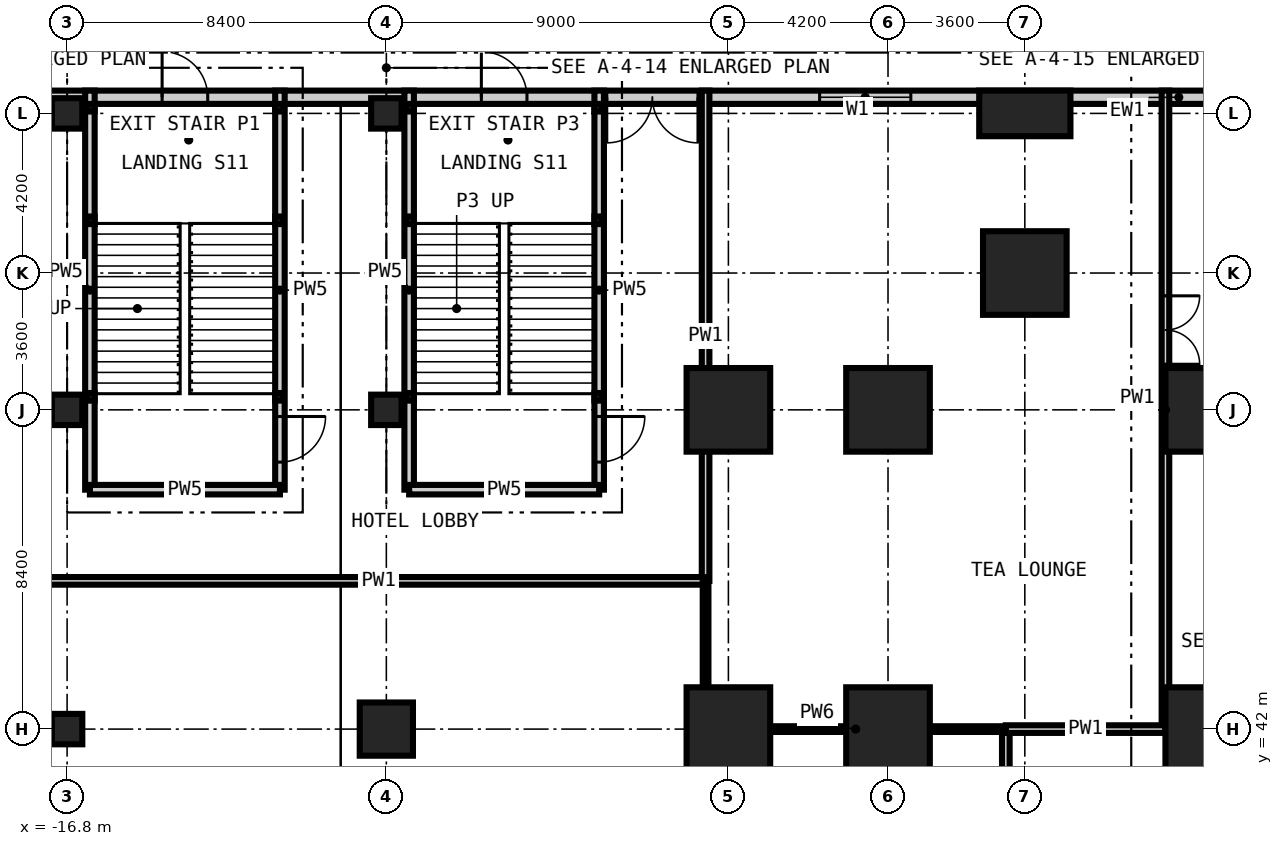
"""IFC4 building model, lengths in metres.
Left out: names, types, materials, properties, quantities, classifications, styles, units other than length and angle.
Written with IfcOpenShell. Run it as: python <this file> out.ifc"""

import sys

from ifc_helpers import new_model, si_unit, direction, frame, frame_2d, origin, origin_2d, place, context, subcontext, project, spatial, rectangle, hollow_rectangle, extrude, element, fill, save


model = new_model("IFC4")
c1 = context("Model", 3, precision=1e-05, world=origin(), true_north=direction((0.0, 1.0)))
c2 = subcontext(c1, "Body", "Model", "MODEL_VIEW")
j1 = project(units=[si_unit("LENGTHUNIT", "METRE"), si_unit("PLANEANGLEUNIT", "RADIAN")], contexts=[c1])
p1 = place(None, origin())
s1 = spatial("IfcSite", under=j1, at=p1, CompositionType="ELEMENT")
p2 = place(p1, origin())
s2 = spatial("IfcBuilding", under=s1, at=p2, CompositionType="ELEMENT")
p3 = place(p2, origin())
s3 = spatial("IfcBuildingStorey", under=s2, at=p3, CompositionType="ELEMENT", Elevation=0.0)
for number, where, z_axis, x_axis in (
    (1, (0.6, 42.0, -0.3), (0.0, 0.0, 1.0), (1.0, 0.0, 0.0)),
    (2, (0.6, 50.4, -0.3), (0.0, 0.0, 1.0), (1.0, 0.0, 0.0)),
    (3, (4.8, 42.0, -0.3), (0.0, 0.0, 1.0), (1.0, 0.0, 0.0)),
    (4, (4.8, 50.4, -0.3), (0.0, 0.0, 1.0), (1.0, 0.0, 0.0)),
    (5, (8.4, 54.0, -0.3), (0.0, 0.0, 1.0), (1.0, 0.0, 0.0)),
):
    element("IfcColumn", number, at=place(p3, frame(where, z_axis=z_axis, x_axis=x_axis)), inside=s3, PredefinedType="COLUMN", context=c2, shape_type="SweptSolid", body=[
        extrude(rectangle(XDim=2.2, YDim=2.2, at=origin_2d()), origin(), (0.0, 0.0, 1.0), 6.0),
    ])
p4 = place(p3, frame((8.4, 58.2, -0.3), z_axis=(0.0, 0.0, 1.0), x_axis=(1.0, 0.0, 0.0)))
e6 = element("IfcColumn", 6, at=p4, inside=s3, PredefinedType="COLUMN", context=c2, shape_type="SweptSolid", body=[
    extrude(rectangle(XDim=2.4, YDim=1.2, at=origin_2d()), origin(), (0.0, 0.0, 1.0), 6.0),
])
for number, where, z_axis, x_axis in (
    (7, (13.2, 42.0, -0.3), (0.0, 0.0, 1.0), (1.0, 0.0, 0.0)),
    (8, (13.2, 50.4, -0.3), (0.0, 0.0, 1.0), (1.0, 0.0, 0.0)),
):
    element("IfcColumn", number, at=place(p3, frame(where, z_axis=z_axis, x_axis=x_axis)), inside=s3, PredefinedType="COLUMN", context=c2, shape_type="SweptSolid", body=[
        extrude(rectangle(XDim=2.2, YDim=2.2, at=origin_2d()), origin(), (0.0, 0.0, 1.0), 6.0),
    ])
p5 = place(p3, frame((-16.8, 42.0, -0.3), z_axis=(0.0, 0.0, 1.0), x_axis=(1.0, 0.0, 0.0)))
e9 = element("IfcColumn", 9, at=p5, inside=s3, PredefinedType="COLUMN", context=c2, shape_type="SweptSolid", body=[
    extrude(rectangle(XDim=0.8, YDim=0.8, at=origin_2d()), origin(), (0.0, 0.0, 1.0), 6.0),
])
for number, where, z_axis, x_axis in (
    (10, (-16.8, 50.4, -0.5), (0.0, 0.0, 1.0), (1.0, 0.0, 0.0)),
    (11, (-16.8, 58.2, -0.5), (0.0, 0.0, 1.0), (1.0, 0.0, 0.0)),
):
    element("IfcColumn", number, at=place(p3, frame(where, z_axis=z_axis, x_axis=x_axis)), inside=s3, PredefinedType="COLUMN", context=c2, shape_type="SweptSolid", body=[
        extrude(rectangle(XDim=0.8, YDim=0.8, at=origin_2d()), origin(), (0.0, 0.0, 1.0), 6.2),
    ])
p6 = place(p3, frame((-8.4, 42.0, -0.3), z_axis=(0.0, 0.0, 1.0), x_axis=(1.0, 0.0, 0.0)))
e12 = element("IfcColumn", 12, at=p6, inside=s3, PredefinedType="COLUMN", context=c2, shape_type="SweptSolid", body=[
    extrude(rectangle(XDim=1.4, YDim=1.4, at=origin_2d()), origin(), (0.0, 0.0, 1.0), 6.0),
])
for number, where, z_axis, x_axis in (
    (13, (-8.4, 50.4, -0.3), (0.0, 0.0, 1.0), (1.0, 0.0, 0.0)),
    (14, (-8.4, 58.2, -0.3), (0.0, 0.0, 1.0), (1.0, 0.0, 0.0)),
):
    element("IfcColumn", number, at=place(p3, frame(where, z_axis=z_axis, x_axis=x_axis)), inside=s3, PredefinedType="COLUMN", context=c2, shape_type="SweptSolid", body=[
        extrude(rectangle(XDim=0.8, YDim=0.8, at=origin_2d()), origin(), (0.0, 0.0, 1.0), 6.0),
    ])
p7 = place(p3, frame((58.8, 58.625, 0.0), z_axis=(0.0, 0.0, 1.0), x_axis=(-1.0, 0.0, 0.0)))
e15 = element("IfcWall", 15, at=p7, inside=s3, PredefinedType="SOLIDWALL", context=c2, shape_type="SweptSolid", body=[
    extrude(rectangle(XDim=92.4, YDim=0.35, at=frame_2d((46.2, 0.0))), origin(), (0.0, 0.0, 1.0), 5.7),
])
p8 = place(p7, frame((85.2, 0.0, 0.0)))
e16 = element("IfcOpeningElement", 16, at=p8, cuts=e15, PredefinedType="OPENING", context=c2, shape_type="SweptSolid", body=[
    extrude(rectangle(XDim=1.8, YDim=2.7, at=frame_2d((0.9, 1.35))), frame((0.0, 0.185, 0.0), z_axis=(0.0, -1.0, 0.0), x_axis=(1.0, 0.0, 0.0)), (0.0, 0.0, 1.0), 0.37),
])
p9 = place(p7, frame((87.2, 0.0, 0.9)))
e17 = element("IfcOpeningElement", 17, at=p9, cuts=e15, PredefinedType="OPENING", context=c2, shape_type="SweptSolid", body=[
    extrude(rectangle(XDim=2.4, YDim=2.4, at=frame_2d((1.2, 1.2))), frame((0.0, 0.185, 0.0), z_axis=(0.0, -1.0, 0.0), x_axis=(1.0, 0.0, 0.0)), (0.0, 0.0, 1.0), 0.37),
])
p10 = place(p7, frame((80.7, 0.0, 0.9)))
e18 = element("IfcOpeningElement", 18, at=p10, cuts=e15, PredefinedType="OPENING", context=c2, shape_type="SweptSolid", body=[
    extrude(rectangle(XDim=2.4, YDim=2.4, at=frame_2d((1.2, 1.2))), frame((0.0, 0.185, 0.0), z_axis=(0.0, -1.0, 0.0), x_axis=(1.0, 0.0, 0.0)), (0.0, 0.0, 1.0), 0.37),
])
p11 = place(p7, frame((76.2, 0.0, 0.9)))
e19 = element("IfcOpeningElement", 19, at=p11, cuts=e15, PredefinedType="OPENING", context=c2, shape_type="SweptSolid", body=[
    extrude(rectangle(XDim=2.4, YDim=2.4, at=frame_2d((1.2, 1.2))), frame((0.0, 0.185, 0.0), z_axis=(0.0, -1.0, 0.0), x_axis=(1.0, 0.0, 0.0)), (0.0, 0.0, 1.0), 0.37),
])
p12 = place(p7, frame((71.9, 0.0, 0.0)))
e20 = element("IfcOpeningElement", 20, at=p12, cuts=e15, PredefinedType="OPENING", context=c2, shape_type="SweptSolid", body=[
    extrude(rectangle(XDim=1.2, YDim=2.4, at=frame_2d((0.6, 1.2))), frame((0.0, 0.185, 0.0), z_axis=(0.0, -1.0, 0.0), x_axis=(1.0, 0.0, 0.0)), (0.0, 0.0, 1.0), 0.37),
])
p13 = place(p7, frame((63.5, 0.0, 0.0)))
e21 = element("IfcOpeningElement", 21, at=p13, cuts=e15, PredefinedType="OPENING", context=c2, shape_type="SweptSolid", body=[
    extrude(rectangle(XDim=1.2, YDim=2.4, at=frame_2d((0.6, 1.2))), frame((0.0, 0.185, 0.0), z_axis=(0.0, -1.0, 0.0), x_axis=(1.0, 0.0, 0.0)), (0.0, 0.0, 1.0), 0.37),
])
p14 = place(p7, frame((59.0, 0.0, 0.0)))
e22 = element("IfcOpeningElement", 22, at=p14, cuts=e15, PredefinedType="OPENING", context=c2, shape_type="SweptSolid", body=[
    extrude(rectangle(XDim=2.4, YDim=3.0, at=frame_2d((1.2, 1.5))), frame((0.0, 0.185, 0.0), z_axis=(0.0, -1.0, 0.0), x_axis=(1.0, 0.0, 0.0)), (0.0, 0.0, 1.0), 0.37),
])
p15 = place(p7, frame((53.4, 0.0, 0.9)))
e23 = element("IfcOpeningElement", 23, at=p15, cuts=e15, PredefinedType="OPENING", context=c2, shape_type="SweptSolid", body=[
    extrude(rectangle(XDim=2.4, YDim=2.4, at=frame_2d((1.2, 1.2))), frame((0.0, 0.185, 0.0), z_axis=(0.0, -1.0, 0.0), x_axis=(1.0, 0.0, 0.0)), (0.0, 0.0, 1.0), 0.37),
])
p16 = place(p7, frame((43.25, 0.0, 0.0)))
e24 = element("IfcOpeningElement", 24, at=p16, cuts=e15, PredefinedType="OPENING", context=c2, shape_type="SweptSolid", body=[
    extrude(rectangle(XDim=2.4, YDim=3.0, at=frame_2d((1.2, 1.5))), frame((0.0, 0.185, 0.0), z_axis=(0.0, -1.0, 0.0), x_axis=(1.0, 0.0, 0.0)), (0.0, 0.0, 1.0), 0.37),
])
p17 = place(p7, frame((37.7, 0.0, 0.0)))
e25 = element("IfcOpeningElement", 25, at=p17, cuts=e15, PredefinedType="OPENING", context=c2, shape_type="SweptSolid", body=[
    extrude(rectangle(XDim=1.2, YDim=2.4, at=frame_2d((0.6, 1.2))), frame((0.0, 0.185, 0.0), z_axis=(0.0, -1.0, 0.0), x_axis=(1.0, 0.0, 0.0)), (0.0, 0.0, 1.0), 0.37),
])
p18 = place(p7, frame((29.2, 0.0, 0.0)))
e26 = element("IfcOpeningElement", 26, at=p18, cuts=e15, PredefinedType="OPENING", context=c2, shape_type="SweptSolid", body=[
    extrude(rectangle(XDim=1.2, YDim=2.4, at=frame_2d((0.6, 1.2))), frame((0.0, 0.185, 0.0), z_axis=(0.0, -1.0, 0.0), x_axis=(1.0, 0.0, 0.0)), (0.0, 0.0, 1.0), 0.37),
])
p19 = place(p7, frame((3.5, 0.0, 0.0)))
e27 = element("IfcOpeningElement", 27, at=p19, cuts=e15, PredefinedType="OPENING", context=c2, shape_type="SweptSolid", body=[
    extrude(rectangle(XDim=3.6, YDim=4.5, at=frame_2d((1.8, 2.25))), frame((0.0, 0.185, 0.0), z_axis=(0.0, -1.0, 0.0), x_axis=(1.0, 0.0, 0.0)), (0.0, 0.0, 1.0), 0.37),
])
p20 = place(p7, frame((11.4, 0.0, 0.9)))
e28 = element("IfcOpeningElement", 28, at=p20, cuts=e15, PredefinedType="OPENING", context=c2, shape_type="SweptSolid", body=[
    extrude(rectangle(XDim=2.4, YDim=2.4, at=frame_2d((1.2, 1.2))), frame((0.0, 0.185, 0.0), z_axis=(0.0, -1.0, 0.0), x_axis=(1.0, 0.0, 0.0)), (0.0, 0.0, 1.0), 0.37),
])
p21 = place(p3, frame((0.0, 45.9, 0.0), z_axis=(0.0, 0.0, 1.0), x_axis=(0.0, 1.0, 0.0)))
e29 = element("IfcWall", 29, at=p21, inside=s3, PredefinedType="PARTITIONING", context=c2, shape_type="SweptSolid", body=[
    extrude(rectangle(XDim=12.9, YDim=0.2, at=frame_2d((6.45, 0.0))), origin(), (0.0, 0.0, 1.0), 5.7),
])
p22 = place(p3, frame((-18.0, 45.9, 0.0), z_axis=(0.0, 0.0, 1.0), x_axis=(1.0, 0.0, 0.0)))
e30 = element("IfcWall", 30, at=p22, inside=s3, PredefinedType="PARTITIONING", context=c2, shape_type="SweptSolid", body=[
    extrude(rectangle(XDim=18.0, YDim=0.2, at=frame_2d((9.0, 0.0))), origin(), (0.0, 0.0, 1.0), 5.7),
])
p23 = place(p3, frame((7.9, 42.0, 0.0), z_axis=(0.0, 0.0, 1.0), x_axis=(0.0, -1.0, 0.0)))
e31 = element("IfcWall", 31, at=p23, inside=s3, PredefinedType="PARTITIONING", context=c2, shape_type="SweptSolid", body=[
    extrude(rectangle(XDim=21.0, YDim=0.2, at=frame_2d((10.5, 0.0))), origin(), (0.0, 0.0, 1.0), 5.7),
])
p24 = place(p23, frame((9.6, 0.0, 0.0)))
e32 = element("IfcOpeningElement", 32, at=p24, cuts=e31, PredefinedType="OPENING", context=c2, shape_type="SweptSolid", body=[
    extrude(rectangle(XDim=1.8, YDim=2.4, at=frame_2d((0.9, 1.2))), frame((0.0, 0.11, 0.0), z_axis=(0.0, -1.0, 0.0), x_axis=(1.0, 0.0, 0.0)), (0.0, 0.0, 1.0), 0.22),
])
p25 = place(p3, frame((12.1, 58.8, 0.0), z_axis=(0.0, 0.0, 1.0), x_axis=(0.0, -1.0, 0.0)))
e33 = element("IfcWall", 33, at=p25, inside=s3, PredefinedType="PARTITIONING", context=c2, shape_type="SweptSolid", body=[
    extrude(rectangle(XDim=16.8, YDim=0.2, at=frame_2d((8.4, 0.0))), origin(), (0.0, 0.0, 1.0), 5.7),
])
p26 = place(p25, frame((5.4, 0.0, 0.0)))
e34 = element("IfcOpeningElement", 34, at=p26, cuts=e33, PredefinedType="OPENING", context=c2, shape_type="SweptSolid", body=[
    extrude(rectangle(XDim=1.8, YDim=2.4, at=frame_2d((0.9, 1.2))), frame((0.0, 0.11, 0.0), z_axis=(0.0, -1.0, 0.0), x_axis=(1.0, 0.0, 0.0)), (0.0, 0.0, 1.0), 0.22),
])
p27 = place(p3, frame((12.1, 42.0, 0.0), z_axis=(0.0, 0.0, 1.0), x_axis=(-1.0, 0.0, 0.0)))
e35 = element("IfcWall", 35, at=p27, inside=s3, PredefinedType="PARTITIONING", context=c2, shape_type="SweptSolid", body=[
    extrude(rectangle(XDim=4.2, YDim=0.2, at=frame_2d((2.1, 0.0))), origin(), (0.0, 0.0, 1.0), 5.7),
])
p28 = place(p3, frame((0.0, 12.9, 0.0), z_axis=(0.0, 0.0, 1.0), x_axis=(0.0, 1.0, 0.0)))
e36 = element("IfcWall", 36, at=p28, inside=s3, PredefinedType="PARTITIONING", context=c2, shape_type="SweptSolid", body=[
    extrude(rectangle(XDim=33.0, YDim=0.15, at=frame_2d((16.5, 0.0))), origin(), (0.0, 0.0, 1.0), 5.7),
])
p29 = place(p3, frame((0.0, 42.0, 0.0), z_axis=(0.0, 0.0, 1.0), x_axis=(1.0, 0.0, 0.0)))
e37 = element("IfcWall", 37, at=p29, inside=s3, PredefinedType="PARTITIONING", context=c2, shape_type="SweptSolid", body=[
    extrude(rectangle(XDim=7.9, YDim=0.15, at=frame_2d((3.95, 0.0))), origin(), (0.0, 0.0, 1.0), 5.7),
])
p30 = place(p3, frame((-16.2, 48.3, 0.0), z_axis=(0.0, 0.0, 1.0), x_axis=(0.0, 1.0, 0.0)))
e38 = element("IfcWall", 38, at=p30, inside=s3, PredefinedType="PARTITIONING", context=c2, shape_type="SweptSolid", body=[
    extrude(rectangle(XDim=10.5, YDim=0.25, at=frame_2d((5.25, 0.0))), origin(), (0.0, 0.0, 1.0), 5.7),
])
p31 = place(p3, frame((-11.2, 48.3, 0.0), z_axis=(0.0, 0.0, 1.0), x_axis=(0.0, 1.0, 0.0)))
e39 = element("IfcWall", 39, at=p31, inside=s3, PredefinedType="PARTITIONING", context=c2, shape_type="SweptSolid", body=[
    extrude(rectangle(XDim=10.5, YDim=0.25, at=frame_2d((5.25, 0.0))), origin(), (0.0, 0.0, 1.0), 5.7),
])
p32 = place(p31, frame((0.725, 0.0, 0.0)))
e40 = element("IfcOpeningElement", 40, at=p32, cuts=e39, PredefinedType="OPENING", context=c2, shape_type="SweptSolid", body=[
    extrude(rectangle(XDim=1.2, YDim=2.2, at=frame_2d((0.6, 1.1))), frame((0.0, 0.135, 0.0), z_axis=(0.0, -1.0, 0.0), x_axis=(1.0, 0.0, 0.0)), (0.0, 0.0, 1.0), 0.27),
])
p33 = place(p3, frame((-7.8, 48.3, 0.0), z_axis=(0.0, 0.0, 1.0), x_axis=(0.0, 1.0, 0.0)))
e41 = element("IfcWall", 41, at=p33, inside=s3, PredefinedType="PARTITIONING", context=c2, shape_type="SweptSolid", body=[
    extrude(rectangle(XDim=10.5, YDim=0.25, at=frame_2d((5.25, 0.0))), origin(), (0.0, 0.0, 1.0), 5.7),
])
p34 = place(p3, frame((-2.8, 48.3, 0.0), z_axis=(0.0, 0.0, 1.0), x_axis=(0.0, 1.0, 0.0)))
e42 = element("IfcWall", 42, at=p34, inside=s3, PredefinedType="PARTITIONING", context=c2, shape_type="SweptSolid", body=[
    extrude(rectangle(XDim=10.5, YDim=0.25, at=frame_2d((5.25, 0.0))), origin(), (0.0, 0.0, 1.0), 5.7),
])
p35 = place(p34, frame((0.725, 0.0, 0.0)))
e43 = element("IfcOpeningElement", 43, at=p35, cuts=e42, PredefinedType="OPENING", context=c2, shape_type="SweptSolid", body=[
    extrude(rectangle(XDim=1.2, YDim=2.2, at=frame_2d((0.6, 1.1))), frame((0.0, 0.135, 0.0), z_axis=(0.0, -1.0, 0.0), x_axis=(1.0, 0.0, 0.0)), (0.0, 0.0, 1.0), 0.27),
])
for number, where, z_axis, x_axis in (
    (44, (-16.2, 48.3, 0.0), (0.0, 0.0, 1.0), (1.0, 0.0, 0.0)),
    (45, (-7.8, 48.3, 0.0), (0.0, 0.0, 1.0), (1.0, 0.0, 0.0)),
):
    element("IfcWall", number, at=place(p3, frame(where, z_axis=z_axis, x_axis=x_axis)), inside=s3, PredefinedType="PARTITIONING", context=c2, shape_type="SweptSolid", body=[
        extrude(rectangle(XDim=5.0, YDim=0.25, at=frame_2d((2.5, 0.0))), origin(), (0.0, 0.0, 1.0), 5.7),
    ])
for number, where, z_axis, x_axis in (
    (46, (-16.175, 50.742, -0.5), (0.0, 0.0, 1.0), (1.0, 0.0, 0.0)),
    (47, (-11.225, 50.742, -0.5), (0.0, 0.0, 1.0), (1.0, 0.0, 0.0)),
    (48, (-16.175, 55.387, -0.5), (0.0, 0.0, 1.0), (1.0, 0.0, 0.0)),
    (49, (-11.225, 55.387, -0.5), (0.0, 0.0, 1.0), (1.0, 0.0, 0.0)),
    (50, (-16.175, 58.35, -0.5), (0.0, 0.0, 1.0), (1.0, 0.0, 0.0)),
    (51, (-11.225, 58.35, -0.5), (0.0, 0.0, 1.0), (1.0, 0.0, 0.0)),
):
    element("IfcColumn", number, at=place(p3, frame(where, z_axis=z_axis, x_axis=x_axis)), inside=s3, PredefinedType="COLUMN", context=c2, shape_type="SweptSolid", body=[
        extrude(hollow_rectangle(XDim=0.2, YDim=0.2, WallThickness=0.01, at=origin_2d()), origin(), (0.0, 0.0, 1.0), 6.2),
    ])
for number, where, z_axis, x_axis in (
    (52, (-7.775, 50.742, -0.3), (0.0, 0.0, 1.0), (1.0, 0.0, 0.0)),
    (53, (-2.825, 50.742, -0.3), (0.0, 0.0, 1.0), (1.0, 0.0, 0.0)),
    (54, (-7.775, 55.387, -0.3), (0.0, 0.0, 1.0), (1.0, 0.0, 0.0)),
    (55, (-2.825, 55.387, -0.3), (0.0, 0.0, 1.0), (1.0, 0.0, 0.0)),
    (56, (-7.775, 58.35, -0.3), (0.0, 0.0, 1.0), (1.0, 0.0, 0.0)),
    (57, (-2.825, 58.35, -0.3), (0.0, 0.0, 1.0), (1.0, 0.0, 0.0)),
):
    element("IfcColumn", number, at=place(p3, frame(where, z_axis=z_axis, x_axis=x_axis)), inside=s3, PredefinedType="COLUMN", context=c2, shape_type="SweptSolid", body=[
        extrude(hollow_rectangle(XDim=0.2, YDim=0.2, WallThickness=0.01, at=origin_2d()), origin(), (0.0, 0.0, 1.0), 6.0),
    ])
p36 = place(p12, frame((1.2, 0.0, 0.0), z_axis=(0.0, 0.0, 1.0), x_axis=(-1.0, 0.0, 0.0)))
e58 = element("IfcDoor", 58, at=p36, inside=s3, OperationType="SINGLE_SWING_LEFT", PredefinedType="DOOR", context=c2, shape_type="SweptSolid", body=[
    extrude(rectangle(XDim=1.2, YDim=2.4, at=frame_2d((0.6, 1.2))), frame((0.0, 0.025, 0.0), z_axis=(0.0, -1.0, 0.0), x_axis=(1.0, 0.0, 0.0)), (0.0, 0.0, 1.0), 0.05),
])
fill(e20, e58)
p37 = place(p13, frame((1.2, 0.0, 0.0), z_axis=(0.0, 0.0, 1.0), x_axis=(-1.0, 0.0, 0.0)))
e59 = element("IfcDoor", 59, at=p37, inside=s3, OperationType="SINGLE_SWING_LEFT", PredefinedType="DOOR", context=c2, shape_type="SweptSolid", body=[
    extrude(rectangle(XDim=1.2, YDim=2.4, at=frame_2d((0.6, 1.2))), frame((0.0, 0.025, 0.0), z_axis=(0.0, -1.0, 0.0), x_axis=(1.0, 0.0, 0.0)), (0.0, 0.0, 1.0), 0.05),
])
fill(e21, e59)
p38 = place(p14, origin())
e60 = element("IfcDoor", 60, at=p38, inside=s3, OperationType="DOUBLE_DOOR_DOUBLE_SWING", PredefinedType="DOOR", context=c2, shape_type="SweptSolid", body=[
    extrude(rectangle(XDim=2.4, YDim=3.0, at=frame_2d((1.2, 1.5))), frame((0.0, 0.025, 0.0), z_axis=(0.0, -1.0, 0.0), x_axis=(1.0, 0.0, 0.0)), (0.0, 0.0, 1.0), 0.05),
])
fill(e22, e60)
p39 = place(p15, origin())
e61 = element("IfcWindow", 61, at=p39, inside=s3, PartitioningType="SINGLE_PANEL", PredefinedType="WINDOW", context=c2, shape_type="SweptSolid", body=[
    extrude(rectangle(XDim=2.4, YDim=2.4, at=frame_2d((1.2, 1.2))), frame((0.0, 0.03, 0.0), z_axis=(0.0, -1.0, 0.0), x_axis=(1.0, 0.0, 0.0)), (0.0, 0.0, 1.0), 0.06),
])
fill(e23, e61)
p40 = place(p32, frame((1.2, 0.0, 0.0), z_axis=(0.0, 0.0, 1.0), x_axis=(-1.0, 0.0, 0.0)))
e62 = element("IfcDoor", 62, at=p40, inside=s3, OperationType="SINGLE_SWING_LEFT", PredefinedType="DOOR", context=c2, shape_type="SweptSolid", body=[
    extrude(rectangle(XDim=1.2, YDim=2.2, at=frame_2d((0.6, 1.1))), frame((0.0, 0.025, 0.0), z_axis=(0.0, -1.0, 0.0), x_axis=(1.0, 0.0, 0.0)), (0.0, 0.0, 1.0), 0.05),
])
fill(e40, e62)
p41 = place(p35, frame((1.2, 0.0, 0.0), z_axis=(0.0, 0.0, 1.0), x_axis=(-1.0, 0.0, 0.0)))
e63 = element("IfcDoor", 63, at=p41, inside=s3, OperationType="SINGLE_SWING_LEFT", PredefinedType="DOOR", context=c2, shape_type="SweptSolid", body=[
    extrude(rectangle(XDim=1.2, YDim=2.2, at=frame_2d((0.6, 1.1))), frame((0.0, 0.025, 0.0), z_axis=(0.0, -1.0, 0.0), x_axis=(1.0, 0.0, 0.0)), (0.0, 0.0, 1.0), 0.05),
])
fill(e43, e63)
p42 = place(p26, origin())
e64 = element("IfcDoor", 64, at=p42, inside=s3, OperationType="DOUBLE_DOOR_DOUBLE_SWING", PredefinedType="DOOR", context=c2, shape_type="SweptSolid", body=[
    extrude(rectangle(XDim=1.8, YDim=2.4, at=frame_2d((0.9, 1.2))), frame((0.0, 0.025, 0.0), z_axis=(0.0, -1.0, 0.0), x_axis=(1.0, 0.0, 0.0)), (0.0, 0.0, 1.0), 0.05),
])
fill(e34, e64)
save(model, sys.argv[1])
